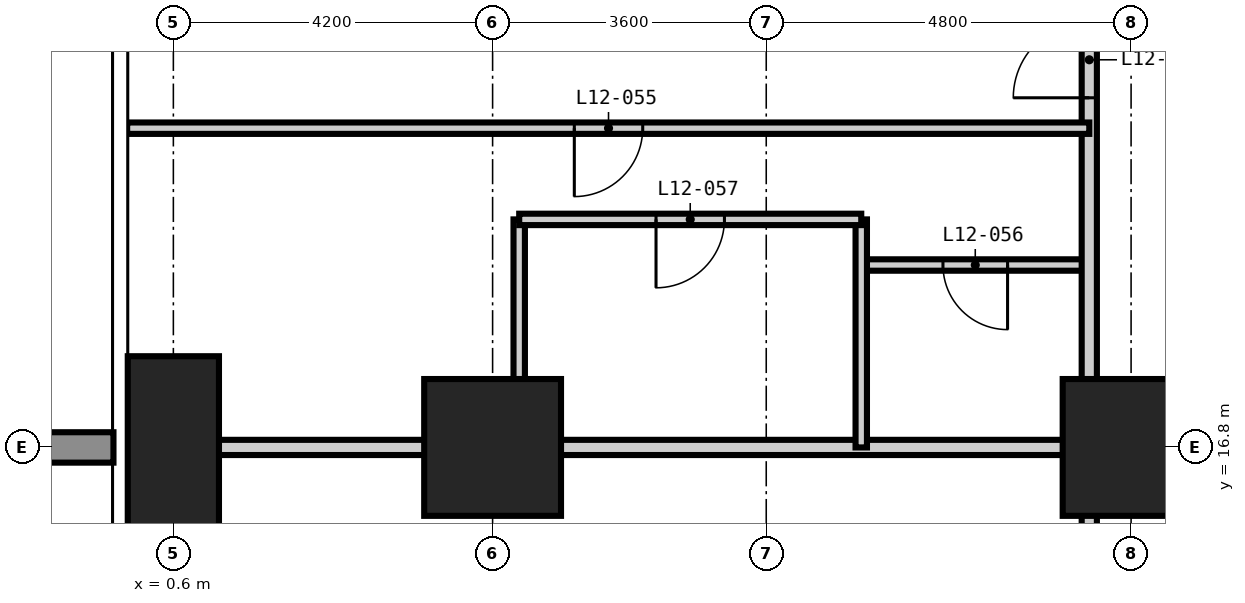
"""IFC4 building model, lengths in metres.
Left out: names, types, materials, properties, quantities, classifications, styles, units other than length and angle.
Written with IfcOpenShell. Run it as: python <this file> out.ifc"""

import sys

from ifc_helpers import new_model, si_unit, direction, frame, frame_2d, origin, origin_2d, place, context, subcontext, project, spatial, rectangle, extrude, element, fill, save


model = new_model("IFC4")
c1 = context("Model", 3, precision=1e-05, world=origin(), true_north=direction((0.0, 1.0)))
c2 = subcontext(c1, "Body", "Model", "MODEL_VIEW")
j1 = project(units=[si_unit("LENGTHUNIT", "METRE"), si_unit("PLANEANGLEUNIT", "RADIAN")], contexts=[c1])
p1 = place(None, origin())
s1 = spatial("IfcSite", under=j1, at=p1, CompositionType="ELEMENT")
p2 = place(p1, origin())
s2 = spatial("IfcBuilding", under=s1, at=p2, CompositionType="ELEMENT")
p3 = place(p2, frame((0.0, 0.0, 52.2)))
s3 = spatial("IfcBuildingStorey", under=s2, at=p3, CompositionType="ELEMENT", Elevation=52.2)
p4 = place(p3, frame((0.6, 16.8, -0.35), z_axis=(0.0, 0.0, 1.0), x_axis=(1.0, 0.0, 0.0)))
e1 = element("IfcColumn", 1, at=p4, inside=s3, PredefinedType="COLUMN", context=c2, shape_type="SweptSolid", body=[
    extrude(rectangle(XDim=1.2, YDim=2.4, at=origin_2d()), origin(), (0.0, 0.0, 1.0), 3.6),
])
for number, where, z_axis, x_axis in (
    (2, (4.8, 16.8, -0.35), (0.0, 0.0, 1.0), (1.0, 0.0, 0.0)),
    (3, (13.2, 16.8, -0.35), (0.0, 0.0, 1.0), (1.0, 0.0, 0.0)),
):
    element("IfcColumn", number, at=place(p3, frame(where, z_axis=z_axis, x_axis=x_axis)), inside=s3, PredefinedType="COLUMN", context=c2, shape_type="SweptSolid", body=[
        extrude(rectangle(XDim=1.8, YDim=1.8, at=origin_2d()), origin(), (0.0, 0.0, 1.0), 3.6),
    ])
p5 = place(p3, frame((9.65, 19.2, 0.0), z_axis=(0.0, 0.0, 1.0), x_axis=(1.0, 0.0, 0.0)))
e4 = element("IfcWall", 4, at=p5, inside=s3, PredefinedType="PARTITIONING", context=c2, shape_type="SweptSolid", body=[
    extrude(rectangle(XDim=3.0, YDim=0.15, at=frame_2d((1.5, 0.0))), origin(), (0.0, 0.0, 1.0), 3.25),
])
p6 = place(p5, frame((1.075, 0.0, 0.0)))
e5 = element("IfcOpeningElement", 5, at=p6, cuts=e4, PredefinedType="OPENING", context=c2, shape_type="SweptSolid", body=[
    extrude(rectangle(XDim=0.85, YDim=2.1, at=frame_2d((0.425, 1.05))), frame((0.0, 0.085, 0.0), z_axis=(0.0, -1.0, 0.0), x_axis=(1.0, 0.0, 0.0)), (0.0, 0.0, 1.0), 0.17),
])
p7 = place(p3, frame((12.65, 12.65, 0.0), z_axis=(0.0, 0.0, 1.0), x_axis=(0.0, 1.0, 0.0)))
e6 = element("IfcWall", 6, at=p7, inside=s3, PredefinedType="PARTITIONING", context=c2, shape_type="SweptSolid", body=[
    extrude(rectangle(XDim=32.9, YDim=0.2, at=frame_2d((16.45, 0.0))), origin(), (0.0, 0.0, 1.0), 3.25),
])
p8 = place(p7, frame((8.75, 0.0, 0.0)))
e7 = element("IfcOpeningElement", 7, at=p8, cuts=e6, PredefinedType="OPENING", context=c2, shape_type="SweptSolid", body=[
    extrude(rectangle(XDim=1.0, YDim=2.2, at=frame_2d((0.5, 1.1))), frame((0.0, 0.11, 0.0), z_axis=(0.0, -1.0, 0.0), x_axis=(1.0, 0.0, 0.0)), (0.0, 0.0, 1.0), 0.22),
])
p9 = place(p7, frame((17.0, 0.0, 0.0)))
e8 = element("IfcOpeningElement", 8, at=p9, cuts=e6, PredefinedType="OPENING", context=c2, shape_type="SweptSolid", body=[
    extrude(rectangle(XDim=1.0, YDim=2.2, at=frame_2d((0.5, 1.1))), frame((0.0, 0.11, 0.0), z_axis=(0.0, -1.0, 0.0), x_axis=(1.0, 0.0, 0.0)), (0.0, 0.0, 1.0), 0.22),
])
p10 = place(p7, frame((23.9, 0.0, 0.0)))
e9 = element("IfcOpeningElement", 9, at=p10, cuts=e6, PredefinedType="OPENING", context=c2, shape_type="SweptSolid", body=[
    extrude(rectangle(XDim=1.0, YDim=2.2, at=frame_2d((0.5, 1.1))), frame((0.0, 0.11, 0.0), z_axis=(0.0, -1.0, 0.0), x_axis=(1.0, 0.0, 0.0)), (0.0, 0.0, 1.0), 0.22),
])
p11 = place(p7, frame((25.4, 0.0, 0.0)))
e10 = element("IfcOpeningElement", 10, at=p11, cuts=e6, PredefinedType="OPENING", context=c2, shape_type="SweptSolid", body=[
    extrude(rectangle(XDim=1.0, YDim=2.2, at=frame_2d((0.5, 1.1))), frame((0.0, 0.11, 0.0), z_axis=(0.0, -1.0, 0.0), x_axis=(1.0, 0.0, 0.0)), (0.0, 0.0, 1.0), 0.22),
])
p12 = place(p7, frame((1.575, 0.0, 0.0)))
e11 = element("IfcOpeningElement", 11, at=p12, cuts=e6, PredefinedType="OPENING", context=c2, shape_type="SweptSolid", body=[
    extrude(rectangle(XDim=1.0, YDim=2.2, at=frame_2d((0.5, 1.1))), frame((0.0, 0.11, 0.0), z_axis=(0.0, -1.0, 0.0), x_axis=(1.0, 0.0, 0.0)), (0.0, 0.0, 1.0), 0.22),
])
p13 = place(p7, frame((30.625, 0.0, 0.0)))
e12 = element("IfcOpeningElement", 12, at=p13, cuts=e6, PredefinedType="OPENING", context=c2, shape_type="SweptSolid", body=[
    extrude(rectangle(XDim=1.0, YDim=2.2, at=frame_2d((0.5, 1.1))), frame((0.0, 0.11, 0.0), z_axis=(0.0, -1.0, 0.0), x_axis=(1.0, 0.0, 0.0)), (0.0, 0.0, 1.0), 0.22),
])
p14 = place(p3, frame((-0.008, 16.8, 0.0), z_axis=(0.0, 0.0, 1.0), x_axis=(1.0, 0.0, 0.0)))
e13 = element("IfcWall", 13, at=p14, inside=s3, PredefinedType="PARTITIONING", context=c2, shape_type="SweptSolid", body=[
    extrude(rectangle(XDim=12.658, YDim=0.2, at=frame_2d((6.329, 0.0))), origin(), (0.0, 0.0, 1.0), 3.25),
])
for number, where, z_axis, x_axis in (
    (14, (5.15, 16.8, 0.0), (0.0, 0.0, 1.0), (0.0, 1.0, 0.0)),
    (15, (9.65, 16.8, 0.0), (0.0, 0.0, 1.0), (0.0, 1.0, 0.0)),
):
    element("IfcWall", number, at=place(p3, frame(where, z_axis=z_axis, x_axis=x_axis)), inside=s3, PredefinedType="PARTITIONING", context=c2, shape_type="SweptSolid", body=[
        extrude(rectangle(XDim=3.0, YDim=0.15, at=frame_2d((1.5, 0.0))), origin(), (0.0, 0.0, 1.0), 3.25),
    ])
p15 = place(p3, frame((5.15, 19.8, 0.0), z_axis=(0.0, 0.0, 1.0), x_axis=(1.0, 0.0, 0.0)))
e16 = element("IfcWall", 16, at=p15, inside=s3, PredefinedType="PARTITIONING", context=c2, shape_type="SweptSolid", body=[
    extrude(rectangle(XDim=4.5, YDim=0.15, at=frame_2d((2.25, 0.0))), origin(), (0.0, 0.0, 1.0), 3.25),
])
p16 = place(p15, frame((1.8, 0.0, 0.0)))
e17 = element("IfcOpeningElement", 17, at=p16, cuts=e16, PredefinedType="OPENING", context=c2, shape_type="SweptSolid", body=[
    extrude(rectangle(XDim=0.9, YDim=2.1, at=frame_2d((0.45, 1.05))), frame((0.0, 0.085, 0.0), z_axis=(0.0, -1.0, 0.0), x_axis=(1.0, 0.0, 0.0)), (0.0, 0.0, 1.0), 0.17),
])
p17 = place(p3, frame((-0.008, 21.0, 0.0), z_axis=(0.0, 0.0, 1.0), x_axis=(1.0, 0.0, 0.0)))
e18 = element("IfcWall", 18, at=p17, inside=s3, PredefinedType="PARTITIONING", context=c2, shape_type="SweptSolid", body=[
    extrude(rectangle(XDim=12.658, YDim=0.15, at=frame_2d((6.329, 0.0))), origin(), (0.0, 0.0, 1.0), 3.25),
])
p18 = place(p17, frame((5.883, 0.0, 0.0)))
e19 = element("IfcOpeningElement", 19, at=p18, cuts=e18, PredefinedType="OPENING", context=c2, shape_type="SweptSolid", body=[
    extrude(rectangle(XDim=0.9, YDim=2.1, at=frame_2d((0.45, 1.05))), frame((0.0, 0.085, 0.0), z_axis=(0.0, -1.0, 0.0), x_axis=(1.0, 0.0, 0.0)), (0.0, 0.0, 1.0), 0.17),
])
p19 = place(p8, origin())
e20 = element("IfcDoor", 20, at=p19, inside=s3, OperationType="SINGLE_SWING_LEFT", PredefinedType="DOOR", context=c2, shape_type="SweptSolid", body=[
    extrude(rectangle(XDim=1.0, YDim=2.2, at=frame_2d((0.5, 1.1))), frame((0.0, 0.025, 0.0), z_axis=(0.0, -1.0, 0.0), x_axis=(1.0, 0.0, 0.0)), (0.0, 0.0, 1.0), 0.05),
])
fill(e7, e20)
p20 = place(p18, frame((0.9, 0.0, 0.0), z_axis=(0.0, 0.0, 1.0), x_axis=(-1.0, 0.0, 0.0)))
e21 = element("IfcDoor", 21, at=p20, inside=s3, OperationType="SINGLE_SWING_RIGHT", PredefinedType="DOOR", context=c2, shape_type="SweptSolid", body=[
    extrude(rectangle(XDim=0.9, YDim=2.1, at=frame_2d((0.45, 1.05))), frame((0.0, 0.025, 0.0), z_axis=(0.0, -1.0, 0.0), x_axis=(1.0, 0.0, 0.0)), (0.0, 0.0, 1.0), 0.05),
])
fill(e19, e21)
p21 = place(p6, frame((0.85, 0.0, 0.0), z_axis=(0.0, 0.0, 1.0), x_axis=(-1.0, 0.0, 0.0)))
e22 = element("IfcDoor", 22, at=p21, inside=s3, OperationType="SINGLE_SWING_LEFT", PredefinedType="DOOR", context=c2, shape_type="SweptSolid", body=[
    extrude(rectangle(XDim=0.85, YDim=2.1, at=frame_2d((0.425, 1.05))), frame((0.0, 0.025, 0.0), z_axis=(0.0, -1.0, 0.0), x_axis=(1.0, 0.0, 0.0)), (0.0, 0.0, 1.0), 0.05),
])
fill(e5, e22)
p22 = place(p16, frame((0.9, 0.0, 0.0), z_axis=(0.0, 0.0, 1.0), x_axis=(-1.0, 0.0, 0.0)))
e23 = element("IfcDoor", 23, at=p22, inside=s3, OperationType="SINGLE_SWING_RIGHT", PredefinedType="DOOR", context=c2, shape_type="SweptSolid", body=[
    extrude(rectangle(XDim=0.9, YDim=2.1, at=frame_2d((0.45, 1.05))), frame((0.0, 0.025, 0.0), z_axis=(0.0, -1.0, 0.0), x_axis=(1.0, 0.0, 0.0)), (0.0, 0.0, 1.0), 0.05),
])
fill(e17, e23)
save(model, sys.argv[1])
